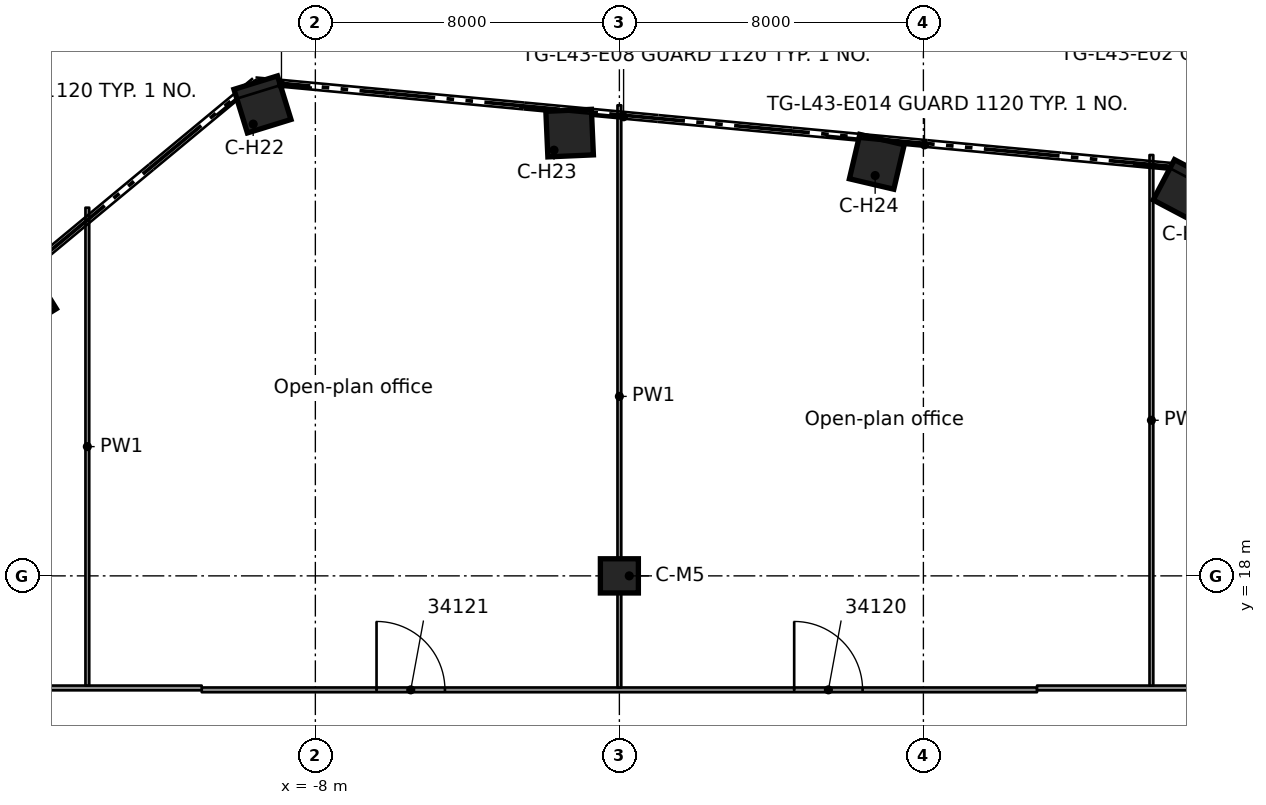
"""IFC4 building model, lengths in metres.
Left out: names, types, materials, properties, quantities, classifications, styles, units other than length and angle.
Written with IfcOpenShell. Run it as: python <this file> out.ifc"""

import sys

from ifc_helpers import new_model, si_unit, direction, frame, frame_2d, origin, origin_2d, place, context, subcontext, project, spatial, rectangle, extrude, element, fill, save


model = new_model("IFC4")
c1 = context("Model", 3, precision=1e-05, world=origin(), true_north=direction((0.0, 1.0)))
c2 = subcontext(c1, "Body", "Model", "MODEL_VIEW")
j1 = project(units=[si_unit("LENGTHUNIT", "METRE"), si_unit("PLANEANGLEUNIT", "RADIAN")], contexts=[c1])
p1 = place(None, origin())
s1 = spatial("IfcSite", under=j1, at=p1, CompositionType="ELEMENT")
p2 = place(p1, origin())
s2 = spatial("IfcBuilding", under=s1, at=p2, CompositionType="ELEMENT")
p3 = place(p2, frame((0.0, 0.0, 167.1)))
s3 = spatial("IfcBuildingStorey", under=s2, at=p3, CompositionType="ELEMENT", Elevation=167.1)
for number, where, z_axis, x_axis in (
    (1, (14.858, 28.141, 0.0), (0.0, 0.0, 1.0), (0.467, 0.884, 0.0)),
    (2, (-15.642, 25.222, 0.0), (0.0, 0.0, 1.0), (-0.527, 0.85, 0.0)),
    (3, (-9.392, 30.405, 0.0), (0.0, 0.0, 1.0), (-0.295, 0.955, 0.0)),
    (4, (-1.309, 29.65, 0.0), (0.0, 0.0, 1.0), (-0.044, 0.999, 0.0)),
    (5, (6.774, 28.895, 0.0), (0.0, 0.0, 1.0), (0.228, 0.974, 0.0)),
):
    element("IfcColumn", number, at=place(p3, frame(where, z_axis=z_axis, x_axis=x_axis)), inside=s3, PredefinedType="COLUMN", context=c2, shape_type="SweptSolid", body=[
        extrude(rectangle(XDim=1.2, YDim=1.2, at=origin_2d()), origin(), (0.0, 0.0, 1.0), 3.5),
    ])
p4 = place(p3, frame((0.0, 18.0, 0.0), z_axis=(0.0, 0.0, 1.0), x_axis=(1.0, 0.0, 0.0)))
e6 = element("IfcColumn", 6, at=p4, inside=s3, PredefinedType="COLUMN", context=c2, shape_type="SweptSolid", body=[
    extrude(rectangle(XDim=1.0, YDim=0.9, at=origin_2d()), origin(), (0.0, 0.0, 1.0), 3.5),
])
p5 = place(p3, frame((-10.99, 15.001, 0.0), z_axis=(0.0, 0.0, 1.0), x_axis=(1.0, 0.0, 0.0)))
e7 = element("IfcWall", 7, at=p5, inside=s3, PredefinedType="PARTITIONING", context=c2, shape_type="SweptSolid", body=[
    extrude(rectangle(XDim=21.98, YDim=0.125, at=frame_2d((10.99, 0.0))), origin(), (0.0, 0.0, 1.0), 3.06),
])
p6 = place(p5, frame((15.59, 0.0, 0.0)))
e8 = element("IfcOpeningElement", 8, at=p6, cuts=e7, PredefinedType="OPENING", context=c2, shape_type="SweptSolid", body=[
    extrude(rectangle(XDim=1.8, YDim=2.1, at=frame_2d((0.9, 1.05))), frame((0.0, 0.073, 0.0), z_axis=(0.0, -1.0, 0.0), x_axis=(1.0, 0.0, 0.0)), (0.0, 0.0, 1.0), 0.145),
])
p7 = place(p5, frame((4.6, 0.0, 0.0)))
e9 = element("IfcOpeningElement", 9, at=p7, cuts=e7, PredefinedType="OPENING", context=c2, shape_type="SweptSolid", body=[
    extrude(rectangle(XDim=1.8, YDim=2.1, at=frame_2d((0.9, 1.05))), frame((0.0, 0.073, 0.0), z_axis=(0.0, -1.0, 0.0), x_axis=(1.0, 0.0, 0.0)), (0.0, 0.0, 1.0), 0.145),
])
for number, where, z_axis, x_axis in (
    (10, (-21.988, 15.051, 0.0), (0.0, 0.0, 1.0), (1.0, 0.0, 0.0)),
    (11, (10.991, 15.051, 0.0), (0.0, 0.0, 1.0), (1.0, 0.0, 0.0)),
):
    element("IfcWall", number, at=place(p3, frame(where, z_axis=z_axis, x_axis=x_axis)), inside=s3, PredefinedType="PARTITIONING", context=c2, shape_type="SweptSolid", body=[
        extrude(rectangle(XDim=10.997, YDim=0.125, at=frame_2d((5.499, 0.0))), origin(), (0.0, 0.0, 1.0), 3.06),
    ])
p8 = place(p3, frame((14.0, 15.114, 0.0), z_axis=(0.0, 0.0, 1.0), x_axis=(0.0, 1.0, 0.0)))
e12 = element("IfcWall", 12, at=p8, inside=s3, PredefinedType="PARTITIONING", context=c2, shape_type="SweptSolid", body=[
    extrude(rectangle(XDim=13.96, YDim=0.1, at=frame_2d((6.98, 0.0))), origin(), (0.0, 0.0, 1.0), 3.06),
])
p9 = place(p3, frame((0.0, 15.063, 0.0), z_axis=(0.0, 0.0, 1.0), x_axis=(0.0, 1.0, 0.0)))
e13 = element("IfcWall", 13, at=p9, inside=s3, PredefinedType="PARTITIONING", context=c2, shape_type="SweptSolid", body=[
    extrude(rectangle(XDim=15.319, YDim=0.1, at=frame_2d((7.66, 0.0))), origin(), (0.0, 0.0, 1.0), 3.06),
])
p10 = place(p3, frame((-14.0, 15.114, 0.0), z_axis=(0.0, 0.0, 1.0), x_axis=(0.0, 1.0, 0.0)))
e14 = element("IfcWall", 14, at=p10, inside=s3, PredefinedType="PARTITIONING", context=c2, shape_type="SweptSolid", body=[
    extrude(rectangle(XDim=12.574, YDim=0.1, at=frame_2d((6.287, 0.0))), origin(), (0.0, 0.0, 1.0), 3.06),
])
p11 = place(p6, origin())
e15 = element("IfcDoor", 15, at=p11, inside=s3, OperationType="DOUBLE_DOOR_SINGLE_SWING", PredefinedType="DOOR", context=c2, shape_type="SweptSolid", body=[
    extrude(rectangle(XDim=1.8, YDim=2.1, at=frame_2d((0.9, 1.05))), frame((0.0, 0.025, 0.0), z_axis=(0.0, -1.0, 0.0), x_axis=(1.0, 0.0, 0.0)), (0.0, 0.0, 1.0), 0.05),
])
fill(e8, e15)
p12 = place(p7, origin())
e16 = element("IfcDoor", 16, at=p12, inside=s3, OperationType="DOUBLE_DOOR_SINGLE_SWING", PredefinedType="DOOR", context=c2, shape_type="SweptSolid", body=[
    extrude(rectangle(XDim=1.8, YDim=2.1, at=frame_2d((0.9, 1.05))), frame((0.0, 0.025, 0.0), z_axis=(0.0, -1.0, 0.0), x_axis=(1.0, 0.0, 0.0)), (0.0, 0.0, 1.0), 0.05),
])
fill(e9, e16)
save(model, sys.argv[1])
